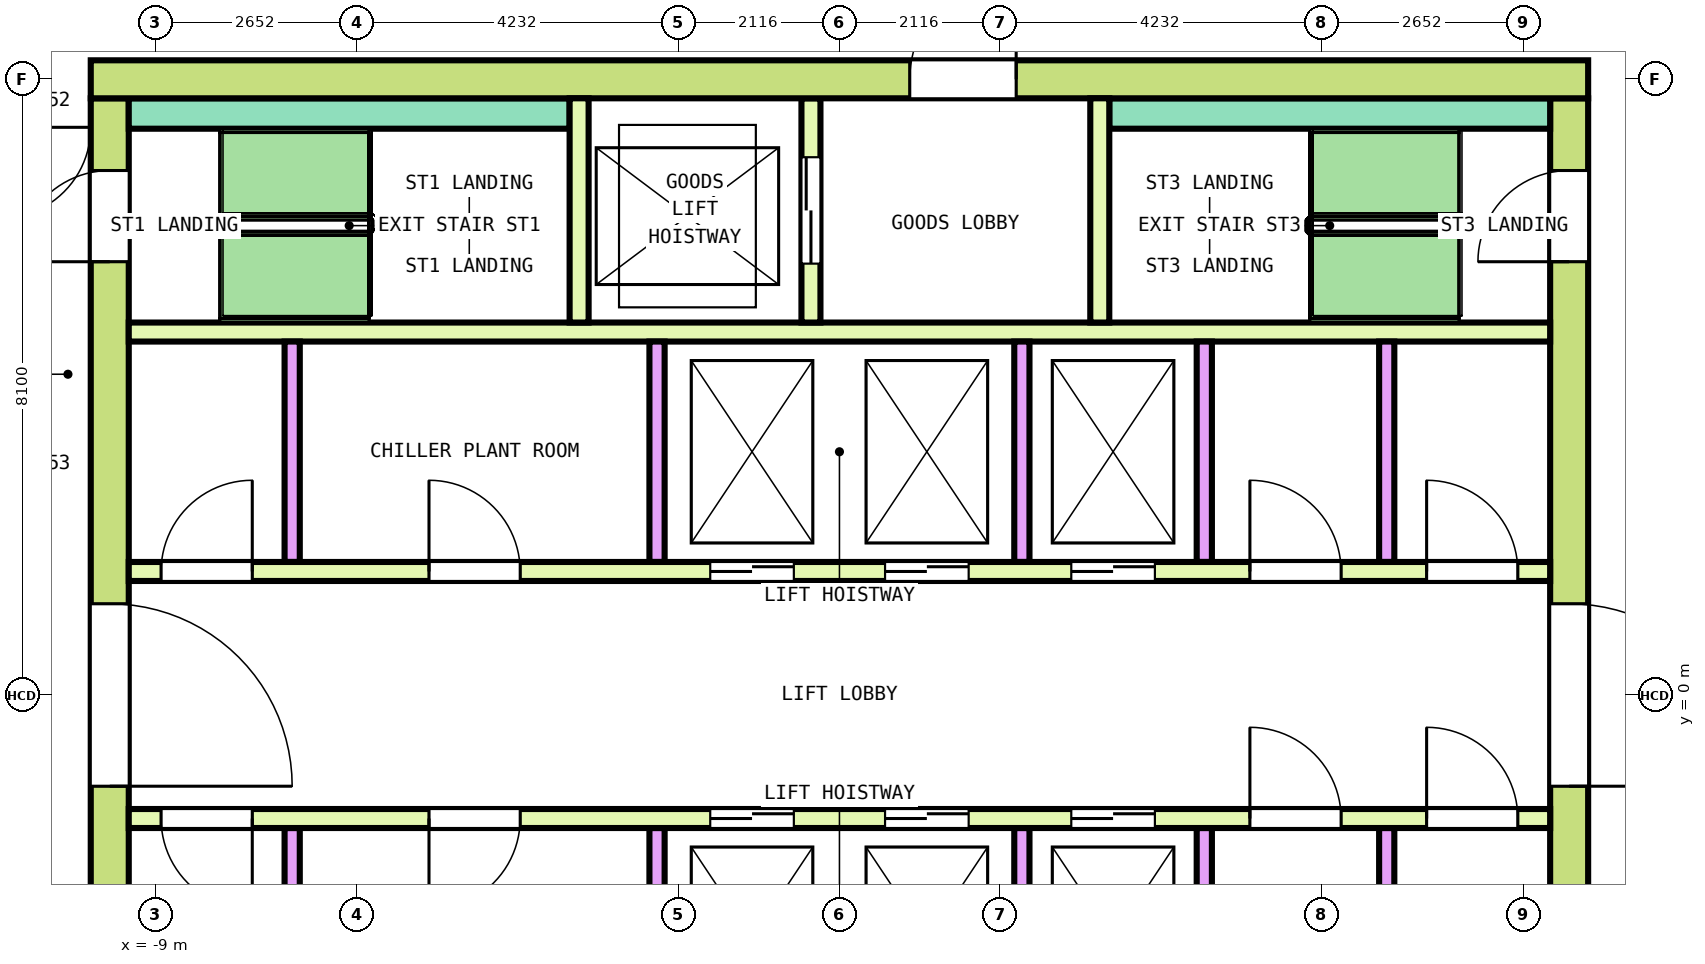
"""IFC4 building model, lengths in metres.
Left out: names, types, materials, properties, quantities, classifications, styles, units other than length and angle.
Written with IfcOpenShell. Run it as: python <this file> out.ifc"""

import sys

from ifc_helpers import new_model, si_unit, direction, frame, frame_2d, origin, place, context, subcontext, project, spatial, rectangle, extrude, element, fill, save


model = new_model("IFC4")
c1 = context("Model", 3, precision=1e-05, world=origin(), true_north=direction((0.0, 1.0)))
c2 = subcontext(c1, "Body", "Model", "MODEL_VIEW")
j1 = project(units=[si_unit("LENGTHUNIT", "METRE"), si_unit("PLANEANGLEUNIT", "RADIAN")], contexts=[c1])
p1 = place(None, origin())
s1 = spatial("IfcSite", under=j1, at=p1, CompositionType="ELEMENT")
p2 = place(p1, origin())
s2 = spatial("IfcBuilding", under=s1, at=p2, CompositionType="ELEMENT")
p3 = place(p2, frame((0.0, 0.0, 303.0)))
s3 = spatial("IfcBuildingStorey", under=s2, at=p3, CompositionType="ELEMENT", Elevation=303.0)
p4 = place(p3, frame((-9.85, 8.1, 0.0), z_axis=(0.0, 0.0, 1.0), x_axis=(1.0, 0.0, 0.0)))
e1 = element("IfcWall", 1, at=p4, inside=s3, PredefinedType="SHEAR", context=c2, shape_type="SweptSolid", body=[
    extrude(rectangle(XDim=19.7, YDim=0.5, at=frame_2d((9.85, 0.0))), origin(), (0.0, 0.0, 1.0), 5.3),
])
p5 = place(p4, frame((10.775, 0.0, 0.0)))
e2 = element("IfcOpeningElement", 2, at=p5, cuts=e1, PredefinedType="OPENING", context=c2, shape_type="SweptSolid", body=[
    extrude(rectangle(XDim=1.4, YDim=2.1, at=frame_2d((0.7, 1.05))), frame((0.0, 0.26, 0.0), z_axis=(0.0, -1.0, 0.0), x_axis=(1.0, 0.0, 0.0)), (0.0, 0.0, 1.0), 0.52),
])
p6 = place(p3, frame((-9.6, -7.85, 0.0), z_axis=(0.0, 0.0, 1.0), x_axis=(0.0, 1.0, 0.0)))
e3 = element("IfcWall", 3, at=p6, inside=s3, PredefinedType="SHEAR", context=c2, shape_type="SweptSolid", body=[
    extrude(rectangle(XDim=15.7, YDim=0.5, at=frame_2d((7.85, 0.0))), origin(), (0.0, 0.0, 1.0), 5.3),
])
p7 = place(p6, frame((6.65, 0.0, 0.0)))
e4 = element("IfcOpeningElement", 4, at=p7, cuts=e3, PredefinedType="OPENING", context=c2, shape_type="SweptSolid", body=[
    extrude(rectangle(XDim=2.4, YDim=2.1, at=frame_2d((1.2, 1.05))), frame((0.0, 0.26, 0.0), z_axis=(0.0, -1.0, 0.0), x_axis=(1.0, 0.0, 0.0)), (0.0, 0.0, 1.0), 0.52),
])
p8 = place(p6, frame((13.55, 0.0, 0.0)))
e5 = element("IfcOpeningElement", 5, at=p8, cuts=e3, PredefinedType="OPENING", context=c2, shape_type="SweptSolid", body=[
    extrude(rectangle(XDim=1.2, YDim=2.1, at=frame_2d((0.6, 1.05))), frame((0.0, 0.26, 0.0), z_axis=(0.0, -1.0, 0.0), x_axis=(1.0, 0.0, 0.0)), (0.0, 0.0, 1.0), 0.52),
])
p9 = place(p6, frame((0.95, 0.0, 0.0)))
e6 = element("IfcOpeningElement", 6, at=p9, cuts=e3, PredefinedType="OPENING", context=c2, shape_type="SweptSolid", body=[
    extrude(rectangle(XDim=1.2, YDim=2.1, at=frame_2d((0.6, 1.05))), frame((0.0, 0.26, 0.0), z_axis=(0.0, -1.0, 0.0), x_axis=(1.0, 0.0, 0.0)), (0.0, 0.0, 1.0), 0.52),
])
p10 = place(p3, frame((9.6, -7.85, 0.0), z_axis=(0.0, 0.0, 1.0), x_axis=(0.0, 1.0, 0.0)))
e7 = element("IfcWall", 7, at=p10, inside=s3, PredefinedType="SHEAR", context=c2, shape_type="SweptSolid", body=[
    extrude(rectangle(XDim=15.7, YDim=0.5, at=frame_2d((7.85, 0.0))), origin(), (0.0, 0.0, 1.0), 5.3),
])
p11 = place(p10, frame((6.65, 0.0, 0.0)))
e8 = element("IfcOpeningElement", 8, at=p11, cuts=e7, PredefinedType="OPENING", context=c2, shape_type="SweptSolid", body=[
    extrude(rectangle(XDim=2.4, YDim=2.1, at=frame_2d((1.2, 1.05))), frame((0.0, 0.26, 0.0), z_axis=(0.0, -1.0, 0.0), x_axis=(1.0, 0.0, 0.0)), (0.0, 0.0, 1.0), 0.52),
])
p12 = place(p10, frame((13.55, 0.0, 0.0)))
e9 = element("IfcOpeningElement", 9, at=p12, cuts=e7, PredefinedType="OPENING", context=c2, shape_type="SweptSolid", body=[
    extrude(rectangle(XDim=1.2, YDim=2.1, at=frame_2d((0.6, 1.05))), frame((0.0, 0.26, 0.0), z_axis=(0.0, -1.0, 0.0), x_axis=(1.0, 0.0, 0.0)), (0.0, 0.0, 1.0), 0.52),
])
p13 = place(p10, frame((1.05, 0.0, 0.0)))
e10 = element("IfcOpeningElement", 10, at=p13, cuts=e7, PredefinedType="OPENING", context=c2, shape_type="SweptSolid", body=[
    extrude(rectangle(XDim=1.0, YDim=2.1, at=frame_2d((0.5, 1.05))), frame((0.0, 0.26, 0.0), z_axis=(0.0, -1.0, 0.0), x_axis=(1.0, 0.0, 0.0)), (0.0, 0.0, 1.0), 0.52),
])
p14 = place(p3, frame((-9.35, 1.625, 0.0), z_axis=(0.0, 0.0, 1.0), x_axis=(1.0, 0.0, 0.0)))
e11 = element("IfcWall", 11, at=p14, inside=s3, PredefinedType="SOLIDWALL", context=c2, shape_type="SweptSolid", body=[
    extrude(rectangle(XDim=18.7, YDim=0.25, at=frame_2d((9.35, 0.0))), origin(), (0.0, 0.0, 1.0), 5.3),
])
p15 = place(p14, frame((7.65, 0.0, 0.0)))
e12 = element("IfcOpeningElement", 12, at=p15, cuts=e11, PredefinedType="OPENING", context=c2, shape_type="SweptSolid", body=[
    extrude(rectangle(XDim=1.1, YDim=2.1, at=frame_2d((0.55, 1.05))), frame((0.0, 0.135, 0.0), z_axis=(0.0, -1.0, 0.0), x_axis=(1.0, 0.0, 0.0)), (0.0, 0.0, 1.0), 0.27),
])
p16 = place(p14, frame((9.95, 0.0, 0.0)))
e13 = element("IfcOpeningElement", 13, at=p16, cuts=e11, PredefinedType="OPENING", context=c2, shape_type="SweptSolid", body=[
    extrude(rectangle(XDim=1.1, YDim=2.1, at=frame_2d((0.55, 1.05))), frame((0.0, 0.135, 0.0), z_axis=(0.0, -1.0, 0.0), x_axis=(1.0, 0.0, 0.0)), (0.0, 0.0, 1.0), 0.27),
])
p17 = place(p14, frame((12.4, 0.0, 0.0)))
e14 = element("IfcOpeningElement", 14, at=p17, cuts=e11, PredefinedType="OPENING", context=c2, shape_type="SweptSolid", body=[
    extrude(rectangle(XDim=1.1, YDim=2.1, at=frame_2d((0.55, 1.05))), frame((0.0, 0.135, 0.0), z_axis=(0.0, -1.0, 0.0), x_axis=(1.0, 0.0, 0.0)), (0.0, 0.0, 1.0), 0.27),
])
p18 = place(p14, frame((0.425, 0.0, 0.0)))
e15 = element("IfcOpeningElement", 15, at=p18, cuts=e11, PredefinedType="OPENING", context=c2, shape_type="SweptSolid", body=[
    extrude(rectangle(XDim=1.2, YDim=2.1, at=frame_2d((0.6, 1.05))), frame((0.0, 0.135, 0.0), z_axis=(0.0, -1.0, 0.0), x_axis=(1.0, 0.0, 0.0)), (0.0, 0.0, 1.0), 0.27),
])
p19 = place(p14, frame((3.95, 0.0, 0.0)))
e16 = element("IfcOpeningElement", 16, at=p19, cuts=e11, PredefinedType="OPENING", context=c2, shape_type="SweptSolid", body=[
    extrude(rectangle(XDim=1.2, YDim=2.1, at=frame_2d((0.6, 1.05))), frame((0.0, 0.135, 0.0), z_axis=(0.0, -1.0, 0.0), x_axis=(1.0, 0.0, 0.0)), (0.0, 0.0, 1.0), 0.27),
])
p20 = place(p14, frame((14.75, 0.0, 0.0)))
e17 = element("IfcOpeningElement", 17, at=p20, cuts=e11, PredefinedType="OPENING", context=c2, shape_type="SweptSolid", body=[
    extrude(rectangle(XDim=1.2, YDim=2.1, at=frame_2d((0.6, 1.05))), frame((0.0, 0.135, 0.0), z_axis=(0.0, -1.0, 0.0), x_axis=(1.0, 0.0, 0.0)), (0.0, 0.0, 1.0), 0.27),
])
p21 = place(p14, frame((17.075, 0.0, 0.0)))
e18 = element("IfcOpeningElement", 18, at=p21, cuts=e11, PredefinedType="OPENING", context=c2, shape_type="SweptSolid", body=[
    extrude(rectangle(XDim=1.2, YDim=2.1, at=frame_2d((0.6, 1.05))), frame((0.0, 0.135, 0.0), z_axis=(0.0, -1.0, 0.0), x_axis=(1.0, 0.0, 0.0)), (0.0, 0.0, 1.0), 0.27),
])
p22 = place(p3, frame((-9.35, 4.775, 0.0), z_axis=(0.0, 0.0, 1.0), x_axis=(1.0, 0.0, 0.0)))
e19 = element("IfcWall", 19, at=p22, inside=s3, PredefinedType="SOLIDWALL", context=c2, shape_type="SweptSolid", body=[
    extrude(rectangle(XDim=18.7, YDim=0.25, at=frame_2d((9.35, 0.0))), origin(), (0.0, 0.0, 1.0), 5.3),
])
for number, where, z_axis, x_axis in (
    (20, (-7.2, 1.75, 0.0), (0.0, 0.0, 1.0), (0.0, 1.0, 0.0)),
    (21, (-2.4, 1.75, 0.0), (0.0, 0.0, 1.0), (0.0, 1.0, 0.0)),
    (22, (2.4, 1.75, 0.0), (0.0, 0.0, 1.0), (0.0, 1.0, 0.0)),
    (23, (4.8, 1.75, 0.0), (0.0, 0.0, 1.0), (0.0, 1.0, 0.0)),
    (24, (7.2, 1.75, 0.0), (0.0, 0.0, 1.0), (0.0, 1.0, 0.0)),
):
    element("IfcWall", number, at=place(p3, frame(where, z_axis=z_axis, x_axis=x_axis)), inside=s3, PredefinedType="SOLIDWALL", context=c2, shape_type="SweptSolid", body=[
        extrude(rectangle(XDim=2.9, YDim=0.2, at=frame_2d((1.45, 0.0))), origin(), (0.0, 0.0, 1.0), 5.3),
    ])
p23 = place(p3, frame((-9.35, -1.625, 0.0), z_axis=(0.0, 0.0, 1.0), x_axis=(1.0, 0.0, 0.0)))
e25 = element("IfcWall", 25, at=p23, inside=s3, PredefinedType="SOLIDWALL", context=c2, shape_type="SweptSolid", body=[
    extrude(rectangle(XDim=18.7, YDim=0.25, at=frame_2d((9.35, 0.0))), origin(), (0.0, 0.0, 1.0), 5.3),
])
p24 = place(p23, frame((7.65, 0.0, 0.0)))
e26 = element("IfcOpeningElement", 26, at=p24, cuts=e25, PredefinedType="OPENING", context=c2, shape_type="SweptSolid", body=[
    extrude(rectangle(XDim=1.1, YDim=2.1, at=frame_2d((0.55, 1.05))), frame((0.0, 0.135, 0.0), z_axis=(0.0, -1.0, 0.0), x_axis=(1.0, 0.0, 0.0)), (0.0, 0.0, 1.0), 0.27),
])
p25 = place(p23, frame((9.95, 0.0, 0.0)))
e27 = element("IfcOpeningElement", 27, at=p25, cuts=e25, PredefinedType="OPENING", context=c2, shape_type="SweptSolid", body=[
    extrude(rectangle(XDim=1.1, YDim=2.1, at=frame_2d((0.55, 1.05))), frame((0.0, 0.135, 0.0), z_axis=(0.0, -1.0, 0.0), x_axis=(1.0, 0.0, 0.0)), (0.0, 0.0, 1.0), 0.27),
])
p26 = place(p23, frame((12.4, 0.0, 0.0)))
e28 = element("IfcOpeningElement", 28, at=p26, cuts=e25, PredefinedType="OPENING", context=c2, shape_type="SweptSolid", body=[
    extrude(rectangle(XDim=1.1, YDim=2.1, at=frame_2d((0.55, 1.05))), frame((0.0, 0.135, 0.0), z_axis=(0.0, -1.0, 0.0), x_axis=(1.0, 0.0, 0.0)), (0.0, 0.0, 1.0), 0.27),
])
p27 = place(p23, frame((0.425, 0.0, 0.0)))
e29 = element("IfcOpeningElement", 29, at=p27, cuts=e25, PredefinedType="OPENING", context=c2, shape_type="SweptSolid", body=[
    extrude(rectangle(XDim=1.2, YDim=2.1, at=frame_2d((0.6, 1.05))), frame((0.0, 0.135, 0.0), z_axis=(0.0, -1.0, 0.0), x_axis=(1.0, 0.0, 0.0)), (0.0, 0.0, 1.0), 0.27),
])
p28 = place(p23, frame((3.95, 0.0, 0.0)))
e30 = element("IfcOpeningElement", 30, at=p28, cuts=e25, PredefinedType="OPENING", context=c2, shape_type="SweptSolid", body=[
    extrude(rectangle(XDim=1.2, YDim=2.1, at=frame_2d((0.6, 1.05))), frame((0.0, 0.135, 0.0), z_axis=(0.0, -1.0, 0.0), x_axis=(1.0, 0.0, 0.0)), (0.0, 0.0, 1.0), 0.27),
])
p29 = place(p23, frame((14.75, 0.0, 0.0)))
e31 = element("IfcOpeningElement", 31, at=p29, cuts=e25, PredefinedType="OPENING", context=c2, shape_type="SweptSolid", body=[
    extrude(rectangle(XDim=1.2, YDim=2.1, at=frame_2d((0.6, 1.05))), frame((0.0, 0.135, 0.0), z_axis=(0.0, -1.0, 0.0), x_axis=(1.0, 0.0, 0.0)), (0.0, 0.0, 1.0), 0.27),
])
p30 = place(p23, frame((17.075, 0.0, 0.0)))
e32 = element("IfcOpeningElement", 32, at=p30, cuts=e25, PredefinedType="OPENING", context=c2, shape_type="SweptSolid", body=[
    extrude(rectangle(XDim=1.2, YDim=2.1, at=frame_2d((0.6, 1.05))), frame((0.0, 0.135, 0.0), z_axis=(0.0, -1.0, 0.0), x_axis=(1.0, 0.0, 0.0)), (0.0, 0.0, 1.0), 0.27),
])
for number, where, z_axis, x_axis in (
    (33, (-7.2, -4.65, 0.0), (0.0, 0.0, 1.0), (0.0, 1.0, 0.0)),
    (34, (-2.4, -4.65, 0.0), (0.0, 0.0, 1.0), (0.0, 1.0, 0.0)),
    (35, (2.4, -4.65, 0.0), (0.0, 0.0, 1.0), (0.0, 1.0, 0.0)),
    (36, (4.8, -4.65, 0.0), (0.0, 0.0, 1.0), (0.0, 1.0, 0.0)),
    (37, (7.2, -4.65, 0.0), (0.0, 0.0, 1.0), (0.0, 1.0, 0.0)),
):
    element("IfcWall", number, at=place(p3, frame(where, z_axis=z_axis, x_axis=x_axis)), inside=s3, PredefinedType="SOLIDWALL", context=c2, shape_type="SweptSolid", body=[
        extrude(rectangle(XDim=2.9, YDim=0.2, at=frame_2d((1.45, 0.0))), origin(), (0.0, 0.0, 1.0), 5.3),
    ])
for number, where, z_axis, x_axis in (
    (38, (-9.35, 7.65, 0.0), (0.0, 0.0, 1.0), (1.0, 0.0, 0.0)),
    (39, (3.55, 7.65, 0.0), (0.0, 0.0, 1.0), (1.0, 0.0, 0.0)),
):
    element("IfcWall", number, at=place(p3, frame(where, z_axis=z_axis, x_axis=x_axis)), inside=s3, PredefinedType="SOLIDWALL", context=c2, shape_type="SweptSolid", body=[
        extrude(rectangle(XDim=5.8, YDim=0.4, at=frame_2d((2.9, 0.0))), origin(), (0.0, 0.0, 1.0), 5.3),
    ])
p31 = place(p3, frame((-3.425, 4.9, 0.0), z_axis=(0.0, 0.0, 1.0), x_axis=(0.0, 1.0, 0.0)))
e40 = element("IfcWall", 40, at=p31, inside=s3, PredefinedType="SOLIDWALL", context=c2, shape_type="SweptSolid", body=[
    extrude(rectangle(XDim=2.95, YDim=0.25, at=frame_2d((1.475, 0.0))), origin(), (0.0, 0.0, 1.0), 5.3),
])
p32 = place(p3, frame((-0.375, 4.9, 0.0), z_axis=(0.0, 0.0, 1.0), x_axis=(0.0, 1.0, 0.0)))
e41 = element("IfcWall", 41, at=p32, inside=s3, PredefinedType="SOLIDWALL", context=c2, shape_type="SweptSolid", body=[
    extrude(rectangle(XDim=2.95, YDim=0.25, at=frame_2d((1.475, 0.0))), origin(), (0.0, 0.0, 1.0), 5.3),
])
p33 = place(p32, frame((0.775, 0.0, 0.0)))
e42 = element("IfcOpeningElement", 42, at=p33, cuts=e41, PredefinedType="OPENING", context=c2, shape_type="SweptSolid", body=[
    extrude(rectangle(XDim=1.4, YDim=2.1, at=frame_2d((0.7, 1.05))), frame((0.0, 0.135, 0.0), z_axis=(0.0, -1.0, 0.0), x_axis=(1.0, 0.0, 0.0)), (0.0, 0.0, 1.0), 0.27),
])
p34 = place(p3, frame((3.425, 4.9, 0.0), z_axis=(0.0, 0.0, 1.0), x_axis=(0.0, 1.0, 0.0)))
e43 = element("IfcWall", 43, at=p34, inside=s3, PredefinedType="SOLIDWALL", context=c2, shape_type="SweptSolid", body=[
    extrude(rectangle(XDim=2.95, YDim=0.25, at=frame_2d((1.475, 0.0))), origin(), (0.0, 0.0, 1.0), 5.3),
])
p35 = place(p15, origin())
e44 = element("IfcDoor", 44, at=p35, inside=s3, OperationType="DOUBLE_DOOR_SLIDING", PredefinedType="DOOR", context=c2, shape_type="SweptSolid", body=[
    extrude(rectangle(XDim=1.1, YDim=2.1, at=frame_2d((0.55, 1.05))), frame((0.0, 0.075, 0.0), z_axis=(0.0, -1.0, 0.0), x_axis=(1.0, 0.0, 0.0)), (0.0, 0.0, 1.0), 0.15),
])
fill(e12, e44)
p36 = place(p16, origin())
e45 = element("IfcDoor", 45, at=p36, inside=s3, OperationType="DOUBLE_DOOR_SLIDING", PredefinedType="DOOR", context=c2, shape_type="SweptSolid", body=[
    extrude(rectangle(XDim=1.1, YDim=2.1, at=frame_2d((0.55, 1.05))), frame((0.0, 0.075, 0.0), z_axis=(0.0, -1.0, 0.0), x_axis=(1.0, 0.0, 0.0)), (0.0, 0.0, 1.0), 0.15),
])
fill(e13, e45)
p37 = place(p17, origin())
e46 = element("IfcDoor", 46, at=p37, inside=s3, OperationType="DOUBLE_DOOR_SLIDING", PredefinedType="DOOR", context=c2, shape_type="SweptSolid", body=[
    extrude(rectangle(XDim=1.1, YDim=2.1, at=frame_2d((0.55, 1.05))), frame((0.0, 0.075, 0.0), z_axis=(0.0, -1.0, 0.0), x_axis=(1.0, 0.0, 0.0)), (0.0, 0.0, 1.0), 0.15),
])
fill(e14, e46)
p38 = place(p24, origin())
e47 = element("IfcDoor", 47, at=p38, inside=s3, OperationType="DOUBLE_DOOR_SLIDING", PredefinedType="DOOR", context=c2, shape_type="SweptSolid", body=[
    extrude(rectangle(XDim=1.1, YDim=2.1, at=frame_2d((0.55, 1.05))), frame((0.0, 0.075, 0.0), z_axis=(0.0, -1.0, 0.0), x_axis=(1.0, 0.0, 0.0)), (0.0, 0.0, 1.0), 0.15),
])
fill(e26, e47)
p39 = place(p25, origin())
e48 = element("IfcDoor", 48, at=p39, inside=s3, OperationType="DOUBLE_DOOR_SLIDING", PredefinedType="DOOR", context=c2, shape_type="SweptSolid", body=[
    extrude(rectangle(XDim=1.1, YDim=2.1, at=frame_2d((0.55, 1.05))), frame((0.0, 0.075, 0.0), z_axis=(0.0, -1.0, 0.0), x_axis=(1.0, 0.0, 0.0)), (0.0, 0.0, 1.0), 0.15),
])
fill(e27, e48)
p40 = place(p26, origin())
e49 = element("IfcDoor", 49, at=p40, inside=s3, OperationType="DOUBLE_DOOR_SLIDING", PredefinedType="DOOR", context=c2, shape_type="SweptSolid", body=[
    extrude(rectangle(XDim=1.1, YDim=2.1, at=frame_2d((0.55, 1.05))), frame((0.0, 0.075, 0.0), z_axis=(0.0, -1.0, 0.0), x_axis=(1.0, 0.0, 0.0)), (0.0, 0.0, 1.0), 0.15),
])
fill(e28, e49)
p41 = place(p33, origin())
e50 = element("IfcDoor", 50, at=p41, inside=s3, OperationType="DOUBLE_DOOR_SLIDING", PredefinedType="DOOR", context=c2, shape_type="SweptSolid", body=[
    extrude(rectangle(XDim=1.4, YDim=2.1, at=frame_2d((0.7, 1.05))), frame((0.0, 0.075, 0.0), z_axis=(0.0, -1.0, 0.0), x_axis=(1.0, 0.0, 0.0)), (0.0, 0.0, 1.0), 0.15),
])
fill(e42, e50)
p42 = place(p7, origin())
e51 = element("IfcDoor", 51, at=p42, inside=s3, OperationType="DOUBLE_DOOR_SINGLE_SWING", PredefinedType="DOOR", context=c2, shape_type="SweptSolid", body=[
    extrude(rectangle(XDim=2.4, YDim=2.1, at=frame_2d((1.2, 1.05))), frame((0.0, 0.2, 0.0), z_axis=(0.0, -1.0, 0.0), x_axis=(1.0, 0.0, 0.0)), (0.0, 0.0, 1.0), 0.4),
])
fill(e4, e51)
p43 = place(p11, origin())
e52 = element("IfcDoor", 52, at=p43, inside=s3, OperationType="DOUBLE_DOOR_SINGLE_SWING", PredefinedType="DOOR", context=c2, shape_type="SweptSolid", body=[
    extrude(rectangle(XDim=2.4, YDim=2.1, at=frame_2d((1.2, 1.05))), frame((0.0, 0.2, 0.0), z_axis=(0.0, -1.0, 0.0), x_axis=(1.0, 0.0, 0.0)), (0.0, 0.0, 1.0), 0.4),
])
fill(e8, e52)
p44 = place(p8, origin())
e53 = element("IfcDoor", 53, at=p44, inside=s3, OperationType="SINGLE_SWING_LEFT", PredefinedType="DOOR", context=c2, shape_type="SweptSolid", body=[
    extrude(rectangle(XDim=1.2, YDim=2.1, at=frame_2d((0.6, 1.05))), frame((0.0, 0.2, 0.0), z_axis=(0.0, -1.0, 0.0), x_axis=(1.0, 0.0, 0.0)), (0.0, 0.0, 1.0), 0.4),
])
fill(e5, e53)
p45 = place(p12, origin())
e54 = element("IfcDoor", 54, at=p45, inside=s3, OperationType="SINGLE_SWING_LEFT", PredefinedType="DOOR", context=c2, shape_type="SweptSolid", body=[
    extrude(rectangle(XDim=1.2, YDim=2.1, at=frame_2d((0.6, 1.05))), frame((0.0, 0.2, 0.0), z_axis=(0.0, -1.0, 0.0), x_axis=(1.0, 0.0, 0.0)), (0.0, 0.0, 1.0), 0.4),
])
fill(e9, e54)
p46 = place(p5, origin())
e55 = element("IfcDoor", 55, at=p46, inside=s3, OperationType="DOUBLE_DOOR_SINGLE_SWING", PredefinedType="DOOR", context=c2, shape_type="SweptSolid", body=[
    extrude(rectangle(XDim=1.4, YDim=2.1, at=frame_2d((0.7, 1.05))), frame((0.0, 0.2, 0.0), z_axis=(0.0, -1.0, 0.0), x_axis=(1.0, 0.0, 0.0)), (0.0, 0.0, 1.0), 0.4),
])
fill(e2, e55)
p47 = place(p18, origin())
e56 = element("IfcDoor", 56, at=p47, inside=s3, OperationType="SINGLE_SWING_LEFT", PredefinedType="DOOR", context=c2, shape_type="SweptSolid", body=[
    extrude(rectangle(XDim=1.2, YDim=2.1, at=frame_2d((0.6, 1.05))), frame((0.0, 0.075, 0.0), z_axis=(0.0, -1.0, 0.0), x_axis=(1.0, 0.0, 0.0)), (0.0, 0.0, 1.0), 0.15),
])
fill(e15, e56)
p48 = place(p19, origin())
e57 = element("IfcDoor", 57, at=p48, inside=s3, OperationType="SINGLE_SWING_RIGHT", PredefinedType="DOOR", context=c2, shape_type="SweptSolid", body=[
    extrude(rectangle(XDim=1.2, YDim=2.1, at=frame_2d((0.6, 1.05))), frame((0.0, 0.075, 0.0), z_axis=(0.0, -1.0, 0.0), x_axis=(1.0, 0.0, 0.0)), (0.0, 0.0, 1.0), 0.15),
])
fill(e16, e57)
p49 = place(p20, origin())
e58 = element("IfcDoor", 58, at=p49, inside=s3, OperationType="SINGLE_SWING_LEFT", PredefinedType="DOOR", context=c2, shape_type="SweptSolid", body=[
    extrude(rectangle(XDim=1.2, YDim=2.1, at=frame_2d((0.6, 1.05))), frame((0.0, 0.075, 0.0), z_axis=(0.0, -1.0, 0.0), x_axis=(1.0, 0.0, 0.0)), (0.0, 0.0, 1.0), 0.15),
])
fill(e17, e58)
p50 = place(p21, origin())
e59 = element("IfcDoor", 59, at=p50, inside=s3, OperationType="SINGLE_SWING_RIGHT", PredefinedType="DOOR", context=c2, shape_type="SweptSolid", body=[
    extrude(rectangle(XDim=1.2, YDim=2.1, at=frame_2d((0.6, 1.05))), frame((0.0, 0.075, 0.0), z_axis=(0.0, -1.0, 0.0), x_axis=(1.0, 0.0, 0.0)), (0.0, 0.0, 1.0), 0.15),
])
fill(e18, e59)
p51 = place(p27, origin())
e60 = element("IfcDoor", 60, at=p51, inside=s3, OperationType="SINGLE_SWING_LEFT", PredefinedType="DOOR", context=c2, shape_type="SweptSolid", body=[
    extrude(rectangle(XDim=1.2, YDim=2.1, at=frame_2d((0.6, 1.05))), frame((0.0, 0.075, 0.0), z_axis=(0.0, -1.0, 0.0), x_axis=(1.0, 0.0, 0.0)), (0.0, 0.0, 1.0), 0.15),
])
fill(e29, e60)
p52 = place(p28, origin())
e61 = element("IfcDoor", 61, at=p52, inside=s3, OperationType="SINGLE_SWING_RIGHT", PredefinedType="DOOR", context=c2, shape_type="SweptSolid", body=[
    extrude(rectangle(XDim=1.2, YDim=2.1, at=frame_2d((0.6, 1.05))), frame((0.0, 0.075, 0.0), z_axis=(0.0, -1.0, 0.0), x_axis=(1.0, 0.0, 0.0)), (0.0, 0.0, 1.0), 0.15),
])
fill(e30, e61)
p53 = place(p29, origin())
e62 = element("IfcDoor", 62, at=p53, inside=s3, OperationType="SINGLE_SWING_LEFT", PredefinedType="DOOR", context=c2, shape_type="SweptSolid", body=[
    extrude(rectangle(XDim=1.2, YDim=2.1, at=frame_2d((0.6, 1.05))), frame((0.0, 0.075, 0.0), z_axis=(0.0, -1.0, 0.0), x_axis=(1.0, 0.0, 0.0)), (0.0, 0.0, 1.0), 0.15),
])
fill(e31, e62)
p54 = place(p30, origin())
e63 = element("IfcDoor", 63, at=p54, inside=s3, OperationType="SINGLE_SWING_RIGHT", PredefinedType="DOOR", context=c2, shape_type="SweptSolid", body=[
    extrude(rectangle(XDim=1.2, YDim=2.1, at=frame_2d((0.6, 1.05))), frame((0.0, 0.075, 0.0), z_axis=(0.0, -1.0, 0.0), x_axis=(1.0, 0.0, 0.0)), (0.0, 0.0, 1.0), 0.15),
])
fill(e32, e63)
save(model, sys.argv[1])
